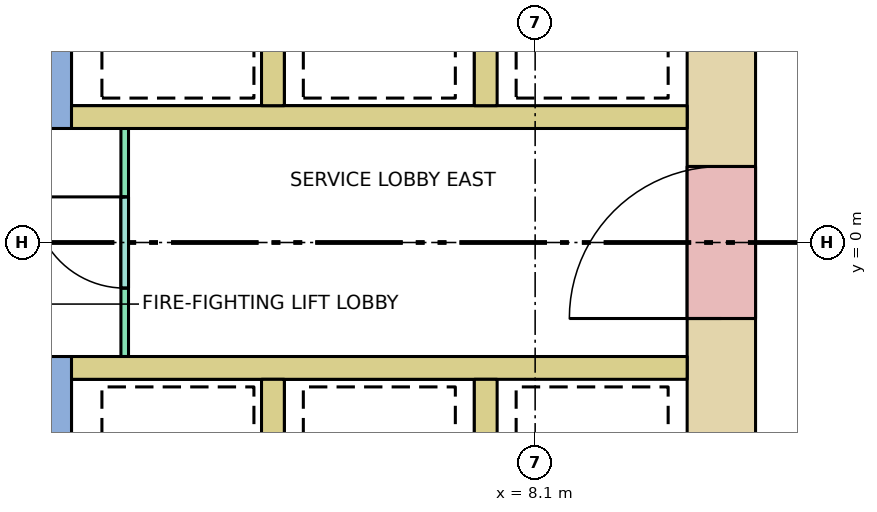
"""IFC4 building model, lengths in metres.
Left out: names, types, materials, properties, quantities, classifications, styles, units other than length and angle.
Written with IfcOpenShell. Run it as: python <this file> out.ifc"""

import sys

from ifc_helpers import new_model, si_unit, direction, frame, frame_2d, origin, place, context, subcontext, project, spatial, rectangle, extrude, element, fill, save


model = new_model("IFC4")
c1 = context("Model", 3, precision=1e-05, world=origin(), true_north=direction((0.0, 1.0)))
c2 = subcontext(c1, "Body", "Model", "MODEL_VIEW")
j1 = project(units=[si_unit("LENGTHUNIT", "METRE"), si_unit("PLANEANGLEUNIT", "RADIAN")], contexts=[c1])
p1 = place(None, origin())
s1 = spatial("IfcSite", under=j1, at=p1, CompositionType="ELEMENT")
p2 = place(p1, origin())
s2 = spatial("IfcBuilding", under=s1, at=p2, CompositionType="ELEMENT")
p3 = place(p2, frame((0.0, 0.0, 51.0)))
s3 = spatial("IfcBuildingStorey", under=s2, at=p3, CompositionType="ELEMENT", Elevation=51.0)
p4 = place(p3, frame((10.55, -5.13, -0.28), z_axis=(0.0, 0.0, 1.0), x_axis=(0.0, 1.0, 0.0)))
e1 = element("IfcWall", 1, at=p4, inside=s3, PredefinedType="SHEAR", context=c2, shape_type="SweptSolid", body=[
    extrude(rectangle(XDim=10.26, YDim=0.9, at=frame_2d((5.13, 0.0))), origin(), (0.0, 0.0, 1.0), 4.0),
])
p5 = place(p4, frame((4.13, 0.0, 0.28)))
e2 = element("IfcOpeningElement", 2, at=p5, cuts=e1, PredefinedType="OPENING", context=c2, shape_type="SweptSolid", body=[
    extrude(rectangle(XDim=2.0, YDim=2.1, at=frame_2d((1.0, 1.05))), frame((0.0, 0.46, 0.0), z_axis=(0.0, -1.0, 0.0), x_axis=(1.0, 0.0, 0.0)), (0.0, 0.0, 1.0), 0.92),
])
for number, where, z_axis, x_axis in (
    (3, (2.0, 1.65, 0.0), (0.0, 0.0, 1.0), (1.0, 0.0, 0.0)),
    (4, (2.0, -1.65, 0.0), (0.0, 0.0, 1.0), (1.0, 0.0, 0.0)),
):
    element("IfcWall", number, at=place(p3, frame(where, z_axis=z_axis, x_axis=x_axis)), inside=s3, PredefinedType="SOLIDWALL", context=c2, shape_type="SweptSolid", body=[
        extrude(rectangle(XDim=8.1, YDim=0.3, at=frame_2d((4.05, 0.0))), origin(), (0.0, 0.0, 1.0), 3.72),
    ])
for number, where, z_axis, x_axis in (
    (5, (4.65, 1.8, 0.0), (0.0, 0.0, 1.0), (0.0, 1.0, 0.0)),
    (6, (4.65, -4.2, 0.0), (0.0, 0.0, 1.0), (0.0, 1.0, 0.0)),
    (7, (7.45, 1.8, 0.0), (0.0, 0.0, 1.0), (0.0, 1.0, 0.0)),
    (8, (7.45, -4.2, 0.0), (0.0, 0.0, 1.0), (0.0, 1.0, 0.0)),
):
    element("IfcWall", number, at=place(p3, frame(where, z_axis=z_axis, x_axis=x_axis)), inside=s3, PredefinedType="SOLIDWALL", context=c2, shape_type="SweptSolid", body=[
        extrude(rectangle(XDim=2.4, YDim=0.3, at=frame_2d((1.2, 0.0))), origin(), (0.0, 0.0, 1.0), 3.72),
    ])
for number, where, z_axis, x_axis in (
    (9, (1.85, 1.5, 0.0), (0.0, 0.0, 1.0), (0.0, 1.0, 0.0)),
    (10, (1.85, -8.1, 0.0), (0.0, 0.0, 1.0), (0.0, 1.0, 0.0)),
):
    element("IfcWall", number, at=place(p3, frame(where, z_axis=z_axis, x_axis=x_axis)), inside=s3, PredefinedType="SHEAR", context=c2, shape_type="SweptSolid", body=[
        extrude(rectangle(XDim=6.6, YDim=0.3, at=frame_2d((3.3, 0.0))), origin(), (0.0, 0.0, 1.0), 3.72),
    ])
p6 = place(p3, frame((2.7, -1.5, 0.0), z_axis=(0.0, 0.0, 1.0), x_axis=(0.0, 1.0, 0.0)))
e11 = element("IfcWall", 11, at=p6, inside=s3, PredefinedType="PARTITIONING", context=c2, shape_type="SweptSolid", body=[
    extrude(rectangle(XDim=3.0, YDim=0.1, at=frame_2d((1.5, 0.0))), origin(), (0.0, 0.0, 1.0), 3.72),
])
p7 = place(p6, frame((0.9, 0.0, 0.0)))
e12 = element("IfcOpeningElement", 12, at=p7, cuts=e11, PredefinedType="OPENING", context=c2, shape_type="SweptSolid", body=[
    extrude(rectangle(XDim=1.2, YDim=2.1, at=frame_2d((0.6, 1.05))), frame((0.0, 0.06, 0.0), z_axis=(0.0, -1.0, 0.0), x_axis=(1.0, 0.0, 0.0)), (0.0, 0.0, 1.0), 0.12),
])
p8 = place(p5, origin())
e13 = element("IfcDoor", 13, at=p8, inside=s3, OperationType="DOUBLE_DOOR_SINGLE_SWING", PredefinedType="DOOR", context=c2, shape_type="SweptSolid", body=[
    extrude(rectangle(XDim=2.0, YDim=2.1, at=frame_2d((1.0, 1.05))), frame((0.0, 0.025, 0.0), z_axis=(0.0, -1.0, 0.0), x_axis=(1.0, 0.0, 0.0)), (0.0, 0.0, 1.0), 0.05),
])
fill(e2, e13)
p9 = place(p7, origin())
e14 = element("IfcDoor", 14, at=p9, inside=s3, OperationType="SINGLE_SWING_RIGHT", PredefinedType="DOOR", context=c2, shape_type="SweptSolid", body=[
    extrude(rectangle(XDim=1.2, YDim=2.1, at=frame_2d((0.6, 1.05))), frame((0.0, 0.025, 0.0), z_axis=(0.0, -1.0, 0.0), x_axis=(1.0, 0.0, 0.0)), (0.0, 0.0, 1.0), 0.05),
])
fill(e12, e14)
save(model, sys.argv[1])
